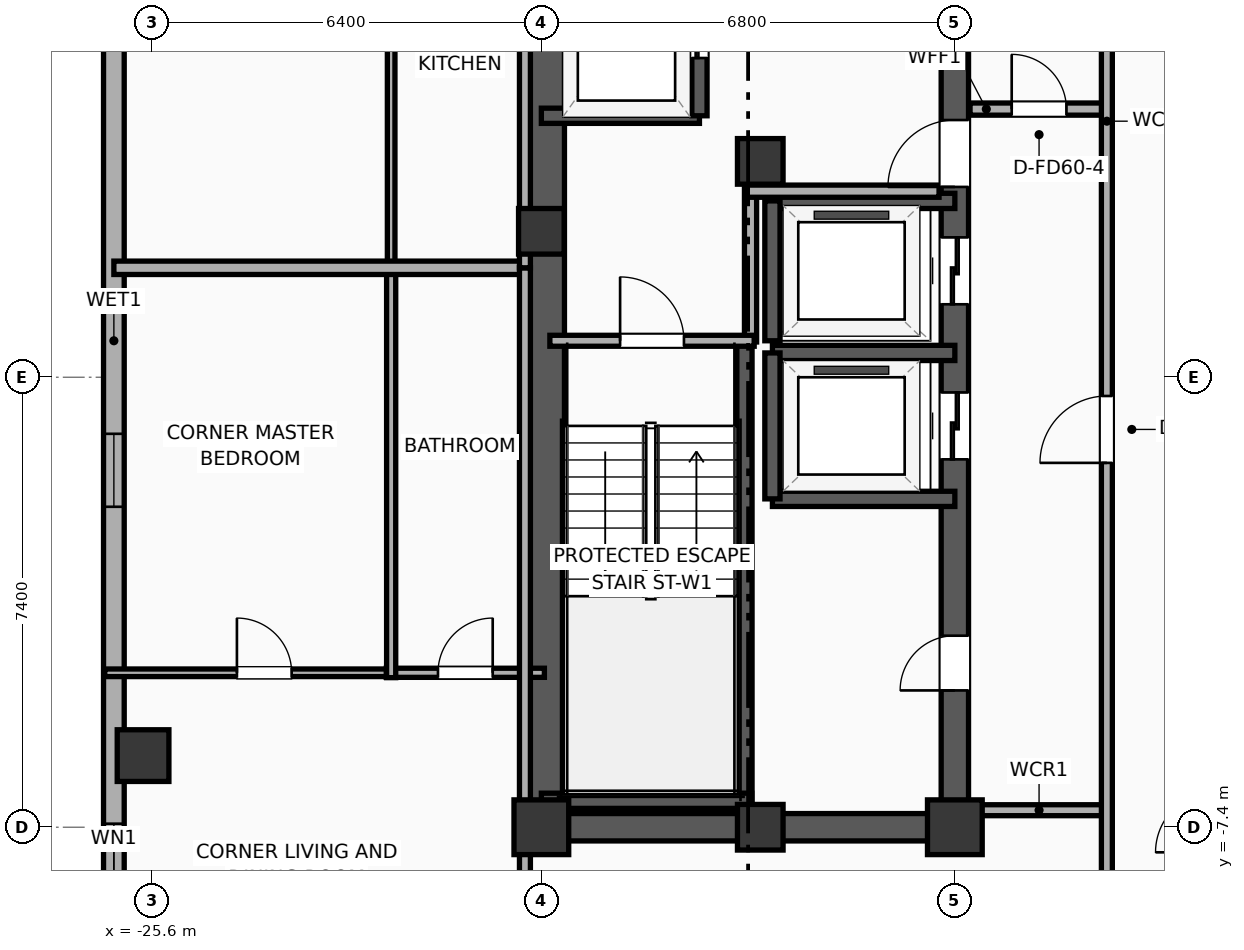
"""IFC4 building model, lengths in metres.
Left out: names, types, materials, properties, quantities, classifications, styles, units other than length and angle.
Written with IfcOpenShell. Run it as: python <this file> out.ifc"""

import sys

from ifc_helpers import new_model, si_unit, direction, frame, frame_2d, origin, origin_2d, place, context, subcontext, project, spatial, rectangle, hollow_rectangle, extrude, element, fill, save


model = new_model("IFC4")
c1 = context("Model", 3, precision=1e-05, world=origin(), true_north=direction((0.0, 1.0)))
c2 = subcontext(c1, "Body", "Model", "MODEL_VIEW")
j1 = project(units=[si_unit("LENGTHUNIT", "METRE"), si_unit("PLANEANGLEUNIT", "RADIAN")], contexts=[c1])
p1 = place(None, origin())
s1 = spatial("IfcSite", under=j1, at=p1, CompositionType="ELEMENT")
p2 = place(p1, origin())
s2 = spatial("IfcBuilding", under=s1, at=p2, CompositionType="ELEMENT")
p3 = place(p2, frame((0.0, 0.0, 200.2)))
s3 = spatial("IfcBuildingStorey", under=s2, at=p3, CompositionType="ELEMENT", Elevation=200.2)
p4 = place(p3, frame((-19.2, -7.4, 0.0), z_axis=(0.0, 0.0, 1.0), x_axis=(1.0, 0.0, 0.0)))
e1 = element("IfcColumn", 1, at=p4, inside=s3, PredefinedType="COLUMN", context=c2, shape_type="SweptSolid", body=[
    extrude(rectangle(XDim=0.9, YDim=0.9, at=origin_2d()), origin(), (0.0, 0.0, 1.0), 3.9),
])
for number, where, z_axis, x_axis in (
    (2, (-19.2, 2.4, 0.0), (0.0, 0.0, 1.0), (1.0, 0.0, 0.0)),
    (3, (-15.6, -7.4, 0.0), (0.0, 0.0, 1.0), (1.0, 0.0, 0.0)),
):
    element("IfcColumn", number, at=place(p3, frame(where, z_axis=z_axis, x_axis=x_axis)), inside=s3, PredefinedType="COLUMN", context=c2, shape_type="SweptSolid", body=[
        extrude(rectangle(XDim=0.75, YDim=0.75, at=origin_2d()), origin(), (0.0, 0.0, 1.0), 3.9),
    ])
p5 = place(p3, frame((-12.4, -7.4, 0.0), z_axis=(0.0, 0.0, 1.0), x_axis=(1.0, 0.0, 0.0)))
e4 = element("IfcColumn", 4, at=p5, inside=s3, PredefinedType="COLUMN", context=c2, shape_type="SweptSolid", body=[
    extrude(rectangle(XDim=0.9, YDim=0.9, at=origin_2d()), origin(), (0.0, 0.0, 1.0), 3.9),
])
p6 = place(p3, frame((-15.6, 3.55, 0.0), z_axis=(0.0, 0.0, 1.0), x_axis=(1.0, 0.0, 0.0)))
e5 = element("IfcColumn", 5, at=p6, inside=s3, PredefinedType="COLUMN", context=c2, shape_type="SweptSolid", body=[
    extrude(rectangle(XDim=0.75, YDim=0.75, at=origin_2d()), origin(), (0.0, 0.0, 1.0), 3.9),
])
p7 = place(p3, frame((-19.425, -7.4, 0.0), z_axis=(0.0, 0.0, 1.0), x_axis=(1.0, 0.0, 0.0)))
e6 = element("IfcWall", 6, at=p7, inside=s3, PredefinedType="SHEAR", context=c2, shape_type="SweptSolid", body=[
    extrude(rectangle(XDim=7.25, YDim=0.45, at=frame_2d((3.625, 0.0))), origin(), (0.0, 0.0, 1.0), 3.65),
])
p8 = place(p3, frame((-19.145, -7.4, 0.0), z_axis=(0.0, 0.0, 1.0), x_axis=(0.0, 1.0, 0.0)))
e7 = element("IfcWall", 7, at=p8, inside=s3, PredefinedType="SHEAR", context=c2, shape_type="SweptSolid", body=[
    extrude(rectangle(XDim=14.8, YDim=0.65, at=frame_2d((7.4, 0.0))), origin(), (0.0, 0.0, 1.0), 3.65),
])
p9 = place(p3, frame((-12.4, -7.4, 0.0), z_axis=(0.0, 0.0, 1.0), x_axis=(0.0, 1.0, 0.0)))
e8 = element("IfcWall", 8, at=p9, inside=s3, PredefinedType="SHEAR", context=c2, shape_type="SweptSolid", body=[
    extrude(rectangle(XDim=14.8, YDim=0.45, at=frame_2d((7.4, 0.0))), origin(), (0.0, 0.0, 1.0), 3.65),
])
p10 = place(p9, frame((6.05, 0.0, 0.0)))
e9 = element("IfcOpeningElement", 9, at=p10, cuts=e8, PredefinedType="OPENING", context=c2, shape_type="SweptSolid", body=[
    extrude(rectangle(XDim=1.1, YDim=2.05, at=frame_2d((0.55, 1.025))), frame((0.0, 0.235, 0.0), z_axis=(0.0, -1.0, 0.0), x_axis=(1.0, 0.0, 0.0)), (0.0, 0.0, 1.0), 0.47),
])
p11 = place(p9, frame((8.6, 0.0, 0.0)))
e10 = element("IfcOpeningElement", 10, at=p11, cuts=e8, PredefinedType="OPENING", context=c2, shape_type="SweptSolid", body=[
    extrude(rectangle(XDim=1.1, YDim=2.05, at=frame_2d((0.55, 1.025))), frame((0.0, 0.235, 0.0), z_axis=(0.0, -1.0, 0.0), x_axis=(1.0, 0.0, 0.0)), (0.0, 0.0, 1.0), 0.47),
])
p12 = place(p9, frame((10.53, 0.0, 0.0)))
e11 = element("IfcOpeningElement", 11, at=p12, cuts=e8, PredefinedType="OPENING", context=c2, shape_type="SweptSolid", body=[
    extrude(rectangle(XDim=1.1, YDim=2.05, at=frame_2d((0.55, 1.025))), frame((0.0, 0.235, 0.0), z_axis=(0.0, -1.0, 0.0), x_axis=(1.0, 0.0, 0.0)), (0.0, 0.0, 1.0), 0.47),
])
p13 = place(p9, frame((2.25, 0.0, 0.0)))
e12 = element("IfcOpeningElement", 12, at=p13, cuts=e8, PredefinedType="OPENING", context=c2, shape_type="SweptSolid", body=[
    extrude(rectangle(XDim=0.9, YDim=2.05, at=frame_2d((0.45, 1.025))), frame((0.0, 0.235, 0.0), z_axis=(0.0, -1.0, 0.0), x_axis=(1.0, 0.0, 0.0)), (0.0, 0.0, 1.0), 0.47),
])
p14 = place(p3, frame((-15.86, -7.085, 0.0), z_axis=(0.0, 0.0, 1.0), x_axis=(0.0, 1.0, 0.0)))
e13 = element("IfcWall", 13, at=p14, inside=s3, PredefinedType="SOLIDWALL", context=c2, shape_type="SweptSolid", body=[
    extrude(rectangle(XDim=7.685, YDim=0.25, at=frame_2d((3.843, 0.0))), origin(), (0.0, 0.0, 1.0), 3.65),
])
p15 = place(p3, frame((-19.2, -6.965, 0.0), z_axis=(0.0, 0.0, 1.0), x_axis=(1.0, 0.0, 0.0)))
e14 = element("IfcWall", 14, at=p15, inside=s3, PredefinedType="SOLIDWALL", context=c2, shape_type="SweptSolid", body=[
    extrude(rectangle(XDim=3.46, YDim=0.25, at=frame_2d((1.73, 0.0))), origin(), (0.0, 0.0, 1.0), 3.65),
])
p16 = place(p3, frame((-25.75, -6.222, 0.0), z_axis=(0.0, 0.0, 1.0), x_axis=(1.0, 0.0, 0.0)))
e15 = element("IfcColumn", 15, at=p16, inside=s3, PredefinedType="COLUMN", context=c2, shape_type="SweptSolid", body=[
    extrude(hollow_rectangle(XDim=0.85, YDim=0.85, WallThickness=0.028, at=origin_2d()), origin(), (0.0, 0.0, 1.0), 3.9),
])
p17 = place(p3, frame((-26.23, -15.383, 0.0), z_axis=(0.0, 0.0, 1.0), x_axis=(0.0, 1.0, 0.0)))
e16 = element("IfcWall", 16, at=p17, inside=s3, PredefinedType="ELEMENTEDWALL", context=c2, shape_type="SweptSolid", body=[
    extrude(rectangle(XDim=31.967, YDim=0.34, at=frame_2d((15.983, 0.0))), origin(), (0.0, 0.0, 1.0), 2.54),
])
p18 = place(p17, frame((6.242, 0.0, 0.75)))
e17 = element("IfcOpeningElement", 17, at=p18, cuts=e16, PredefinedType="OPENING", context=c2, shape_type="SweptSolid", body=[
    extrude(rectangle(XDim=1.8, YDim=1.63, at=frame_2d((0.9, 0.815))), frame((0.0, 0.18, 0.0), z_axis=(0.0, -1.0, 0.0), x_axis=(1.0, 0.0, 0.0)), (0.0, 0.0, 1.0), 0.36),
])
p19 = place(p17, frame((23.925, 0.0, 0.75)))
e18 = element("IfcOpeningElement", 18, at=p19, cuts=e16, PredefinedType="OPENING", context=c2, shape_type="SweptSolid", body=[
    extrude(rectangle(XDim=1.8, YDim=1.63, at=frame_2d((0.9, 0.815))), frame((0.0, 0.18, 0.0), z_axis=(0.0, -1.0, 0.0), x_axis=(1.0, 0.0, 0.0)), (0.0, 0.0, 1.0), 0.36),
])
p20 = place(p17, frame((13.253, 0.0, 0.75)))
e19 = element("IfcOpeningElement", 19, at=p20, cuts=e16, PredefinedType="OPENING", context=c2, shape_type="SweptSolid", body=[
    extrude(rectangle(XDim=1.2, YDim=1.63, at=frame_2d((0.6, 0.815))), frame((0.0, 0.18, 0.0), z_axis=(0.0, -1.0, 0.0), x_axis=(1.0, 0.0, 0.0)), (0.0, 0.0, 1.0), 0.36),
])
p21 = place(p17, frame((29.348, 0.0, 0.75)))
e20 = element("IfcOpeningElement", 20, at=p21, cuts=e16, PredefinedType="OPENING", context=c2, shape_type="SweptSolid", body=[
    extrude(rectangle(XDim=1.2, YDim=1.63, at=frame_2d((0.6, 0.815))), frame((0.0, 0.18, 0.0), z_axis=(0.0, -1.0, 0.0), x_axis=(1.0, 0.0, 0.0)), (0.0, 0.0, 1.0), 0.36),
])
p22 = place(p3, frame((-19.2, 4.3, 0.0), z_axis=(0.0, 0.0, 1.0), x_axis=(1.0, 0.0, 0.0)))
e21 = element("IfcWall", 21, at=p22, inside=s3, PredefinedType="SOLIDWALL", context=c2, shape_type="SweptSolid", body=[
    extrude(rectangle(XDim=2.6, YDim=0.25, at=frame_2d((1.3, 0.0))), origin(), (0.0, 0.0, 1.0), 3.65),
])
p23 = place(p3, frame((-16.6, 4.3, 0.0), z_axis=(0.0, 0.0, 1.0), x_axis=(0.0, 1.0, 0.0)))
e22 = element("IfcWall", 22, at=p23, inside=s3, PredefinedType="SOLIDWALL", context=c2, shape_type="SweptSolid", body=[
    extrude(rectangle(XDim=3.1, YDim=0.25, at=frame_2d((1.55, 0.0))), origin(), (0.0, 0.0, 1.0), 3.65),
])
p24 = place(p23, frame((0.95, 0.0, 0.0)))
e23 = element("IfcOpeningElement", 23, at=p24, cuts=e22, PredefinedType="OPENING", context=c2, shape_type="SweptSolid", body=[
    extrude(rectangle(XDim=1.2, YDim=2.05, at=frame_2d((0.6, 1.025))), frame((0.0, 0.135, 0.0), z_axis=(0.0, -1.0, 0.0), x_axis=(1.0, 0.0, 0.0)), (0.0, 0.0, 1.0), 0.27),
])
for number, where, z_axis, x_axis in (
    (24, (-15.4, -2.0, 0.0), (0.0, 0.0, 1.0), (1.0, 0.0, 0.0)),
    (25, (-12.4, 0.4, 0.0), (0.0, 0.0, 1.0), (-1.0, 0.0, 0.0)),
):
    element("IfcWall", number, at=place(p3, frame(where, z_axis=z_axis, x_axis=x_axis)), inside=s3, PredefinedType="SOLIDWALL", context=c2, shape_type="SweptSolid", body=[
        extrude(rectangle(XDim=3.0, YDim=0.25, at=frame_2d((1.5, 0.0))), origin(), (0.0, 0.0, 1.0), 3.65),
    ])
p25 = place(p3, frame((-15.4, 0.4, 0.0), z_axis=(0.0, 0.0, 1.0), x_axis=(0.0, -1.0, 0.0)))
e26 = element("IfcWall", 26, at=p25, inside=s3, PredefinedType="SOLIDWALL", context=c2, shape_type="SweptSolid", body=[
    extrude(rectangle(XDim=2.4, YDim=0.25, at=frame_2d((1.2, 0.0))), origin(), (0.0, 0.0, 1.0), 3.65),
])
p26 = place(p3, frame((-12.4, 2.9, 0.0), z_axis=(0.0, 0.0, 1.0), x_axis=(-1.0, 0.0, 0.0)))
e27 = element("IfcWall", 27, at=p26, inside=s3, PredefinedType="SOLIDWALL", context=c2, shape_type="SweptSolid", body=[
    extrude(rectangle(XDim=3.0, YDim=0.25, at=frame_2d((1.5, 0.0))), origin(), (0.0, 0.0, 1.0), 3.65),
])
p27 = place(p3, frame((-15.4, 2.9, 0.0), z_axis=(0.0, 0.0, 1.0), x_axis=(0.0, -1.0, 0.0)))
e28 = element("IfcWall", 28, at=p27, inside=s3, PredefinedType="SOLIDWALL", context=c2, shape_type="SweptSolid", body=[
    extrude(rectangle(XDim=2.3, YDim=0.25, at=frame_2d((1.15, 0.0))), origin(), (0.0, 0.0, 1.0), 3.65),
])
p28 = place(p3, frame((-15.76, 0.58, 0.0), z_axis=(0.0, 0.0, 1.0), x_axis=(0.0, 1.0, 0.0)))
e29 = element("IfcWall", 29, at=p28, inside=s3, PredefinedType="PARTITIONING", context=c2, shape_type="SweptSolid", body=[
    extrude(rectangle(XDim=2.52, YDim=0.2, at=frame_2d((1.26, 0.0))), origin(), (0.0, 0.0, 1.0), 3.65),
])
p29 = place(p3, frame((-15.82, 3.06, 0.0), z_axis=(0.0, 0.0, 1.0), x_axis=(1.0, 0.0, 0.0)))
e30 = element("IfcWall", 30, at=p29, inside=s3, PredefinedType="PARTITIONING", context=c2, shape_type="SweptSolid", body=[
    extrude(rectangle(XDim=3.16, YDim=0.2, at=frame_2d((1.58, 0.0))), origin(), (0.0, 0.0, 1.0), 3.65),
])
p30 = place(p3, frame((-19.06, 0.6, 0.0), z_axis=(0.0, 0.0, 1.0), x_axis=(1.0, 0.0, 0.0)))
e31 = element("IfcWall", 31, at=p30, inside=s3, PredefinedType="PARTITIONING", context=c2, shape_type="SweptSolid", body=[
    extrude(rectangle(XDim=3.36, YDim=0.18, at=frame_2d((1.68, 0.0))), origin(), (0.0, 0.0, 1.0), 3.65),
])
p31 = place(p30, frame((1.155, 0.0, 0.0)))
e32 = element("IfcOpeningElement", 32, at=p31, cuts=e31, PredefinedType="OPENING", context=c2, shape_type="SweptSolid", body=[
    extrude(rectangle(XDim=1.05, YDim=2.05, at=frame_2d((0.525, 1.025))), frame((0.0, 0.1, 0.0), z_axis=(0.0, -1.0, 0.0), x_axis=(1.0, 0.0, 0.0)), (0.0, 0.0, 1.0), 0.2),
])
p32 = place(p3, frame((-12.15, 4.41, 0.0), z_axis=(0.0, 0.0, 1.0), x_axis=(1.0, 0.0, 0.0)))
e33 = element("IfcWall", 33, at=p32, inside=s3, PredefinedType="PARTITIONING", context=c2, shape_type="SweptSolid", body=[
    extrude(rectangle(XDim=2.27, YDim=0.2, at=frame_2d((1.135, 0.0))), origin(), (0.0, 0.0, 1.0), 3.65),
])
p33 = place(p32, frame((0.685, 0.0, 0.0)))
e34 = element("IfcOpeningElement", 34, at=p33, cuts=e33, PredefinedType="OPENING", context=c2, shape_type="SweptSolid", body=[
    extrude(rectangle(XDim=0.9, YDim=2.05, at=frame_2d((0.45, 1.025))), frame((0.0, 0.11, 0.0), z_axis=(0.0, -1.0, 0.0), x_axis=(1.0, 0.0, 0.0)), (0.0, 0.0, 1.0), 0.22),
])
p34 = place(p3, frame((-12.15, -7.12, 0.0), z_axis=(0.0, 0.0, 1.0), x_axis=(1.0, 0.0, 0.0)))
e35 = element("IfcWall", 35, at=p34, inside=s3, PredefinedType="PARTITIONING", context=c2, shape_type="SweptSolid", body=[
    extrude(rectangle(XDim=2.27, YDim=0.18, at=frame_2d((1.135, 0.0))), origin(), (0.0, 0.0, 1.0), 3.65),
])
p35 = place(p3, frame((-9.9, -8.58, 0.0), z_axis=(0.0, 0.0, 1.0), x_axis=(0.0, 1.0, 0.0)))
e36 = element("IfcWall", 36, at=p35, inside=s3, PredefinedType="PARTITIONING", context=c2, shape_type="SweptSolid", body=[
    extrude(rectangle(XDim=17.16, YDim=0.18, at=frame_2d((8.58, 0.0))), origin(), (0.0, 0.0, 1.0), 3.65),
])
p36 = place(p35, frame((7.172, 0.0, 0.0)))
e37 = element("IfcOpeningElement", 37, at=p36, cuts=e36, PredefinedType="OPENING", context=c2, shape_type="SweptSolid", body=[
    extrude(rectangle(XDim=1.1, YDim=2.05, at=frame_2d((0.55, 1.025))), frame((0.0, 0.1, 0.0), z_axis=(0.0, -1.0, 0.0), x_axis=(1.0, 0.0, 0.0)), (0.0, 0.0, 1.0), 0.2),
])
p37 = place(p3, frame((-26.38, -4.86, 0.0), z_axis=(0.0, 0.0, 1.0), x_axis=(1.0, 0.0, 0.0)))
e38 = element("IfcWall", 38, at=p37, inside=s3, PredefinedType="PARTITIONING", context=c2, shape_type="SweptSolid", body=[
    extrude(rectangle(XDim=4.77, YDim=0.125, at=frame_2d((2.385, 0.0))), origin(), (0.0, 0.0, 1.0), 3.65),
])
p38 = place(p37, frame((2.174, 0.0, 0.0)))
e39 = element("IfcOpeningElement", 39, at=p38, cuts=e38, PredefinedType="OPENING", context=c2, shape_type="SweptSolid", body=[
    extrude(rectangle(XDim=0.9, YDim=2.05, at=frame_2d((0.45, 1.025))), frame((0.0, 0.073, 0.0), z_axis=(0.0, -1.0, 0.0), x_axis=(1.0, 0.0, 0.0)), (0.0, 0.0, 1.0), 0.145),
])
p39 = place(p3, frame((-21.75, -4.86, 0.0), z_axis=(0.0, 0.0, 1.0), x_axis=(1.0, 0.0, 0.0)))
e40 = element("IfcWall", 40, at=p39, inside=s3, PredefinedType="PLUMBINGWALL", context=c2, shape_type="SweptSolid", body=[
    extrude(rectangle(XDim=2.6, YDim=0.15, at=frame_2d((1.3, 0.0))), origin(), (0.0, 0.0, 1.0), 3.65),
])
p40 = place(p39, frame((0.85, 0.0, 0.0)))
e41 = element("IfcOpeningElement", 41, at=p40, cuts=e40, PredefinedType="OPENING", context=c2, shape_type="SweptSolid", body=[
    extrude(rectangle(XDim=0.9, YDim=2.05, at=frame_2d((0.45, 1.025))), frame((0.0, 0.085, 0.0), z_axis=(0.0, -1.0, 0.0), x_axis=(1.0, 0.0, 0.0)), (0.0, 0.0, 1.0), 0.17),
])
p41 = place(p3, frame((-21.67, -4.94, 0.0), z_axis=(0.0, 0.0, 1.0), x_axis=(0.0, 1.0, 0.0)))
e42 = element("IfcWall", 42, at=p41, inside=s3, PredefinedType="PLUMBINGWALL", context=c2, shape_type="SweptSolid", body=[
    extrude(rectangle(XDim=6.72, YDim=0.15, at=frame_2d((3.36, 0.0))), origin(), (0.0, 0.0, 1.0), 3.65),
])
p42 = place(p3, frame((-21.67, 1.82, 0.0), z_axis=(0.0, 0.0, 1.0), x_axis=(0.0, 1.0, 0.0)))
e43 = element("IfcWall", 43, at=p42, inside=s3, PredefinedType="PARTITIONING", context=c2, shape_type="SweptSolid", body=[
    extrude(rectangle(XDim=6.72, YDim=0.125, at=frame_2d((3.36, 0.0))), origin(), (0.0, 0.0, 1.0), 3.65),
])
p43 = place(p3, frame((-19.47, 1.8, 0.0), z_axis=(0.0, 0.0, 1.0), x_axis=(-1.0, 0.0, 0.0)))
e44 = element("IfcWall", 44, at=p43, inside=s3, PredefinedType="PARTITIONING", context=c2, shape_type="SweptSolid", body=[
    extrude(rectangle(XDim=6.76, YDim=0.22, at=frame_2d((3.38, 0.0))), origin(), (0.0, 0.0, 1.0), 3.65),
])
p44 = place(p3, frame((-19.47, -18.83, 0.0), z_axis=(0.0, 0.0, 1.0), x_axis=(0.0, 1.0, 0.0)))
e45 = element("IfcWall", 45, at=p44, inside=s3, PredefinedType="PARTITIONING", context=c2, shape_type="SweptSolid", body=[
    extrude(rectangle(XDim=20.63, YDim=0.18, at=frame_2d((10.315, 0.0))), origin(), (0.0, 0.0, 1.0), 2.54),
])
p45 = place(p44, frame((9.149, 0.0, 0.0)))
e46 = element("IfcOpeningElement", 46, at=p45, cuts=e45, PredefinedType="OPENING", context=c2, shape_type="SweptSolid", body=[
    extrude(rectangle(XDim=0.9, YDim=2.05, at=frame_2d((0.45, 1.025))), frame((0.0, 0.1, 0.0), z_axis=(0.0, -1.0, 0.0), x_axis=(1.0, 0.0, 0.0)), (0.0, 0.0, 1.0), 0.2),
])
p46 = place(p3, frame((-19.47, 1.8, 0.0), z_axis=(0.0, 0.0, 1.0), x_axis=(0.0, 1.0, 0.0)))
e47 = element("IfcWall", 47, at=p46, inside=s3, PredefinedType="PARTITIONING", context=c2, shape_type="SweptSolid", body=[
    extrude(rectangle(XDim=18.23, YDim=0.18, at=frame_2d((9.115, 0.0))), origin(), (0.0, 0.0, 1.0), 2.54),
])
p47 = place(p46, frame((6.98, 0.0, 0.0)))
e48 = element("IfcOpeningElement", 48, at=p47, cuts=e47, PredefinedType="OPENING", context=c2, shape_type="SweptSolid", body=[
    extrude(rectangle(XDim=0.9, YDim=2.05, at=frame_2d((0.45, 1.025))), frame((0.0, 0.1, 0.0), z_axis=(0.0, -1.0, 0.0), x_axis=(1.0, 0.0, 0.0)), (0.0, 0.0, 1.0), 0.2),
])
p48 = place(p18, origin())
e49 = element("IfcWindow", 49, at=p48, inside=s3, PartitioningType="SINGLE_PANEL", PredefinedType="WINDOW", context=c2, shape_type="SweptSolid", body=[
    extrude(rectangle(XDim=1.8, YDim=1.63, at=frame_2d((0.9, 0.815))), frame((0.0, 0.03, 0.0), z_axis=(0.0, -1.0, 0.0), x_axis=(1.0, 0.0, 0.0)), (0.0, 0.0, 1.0), 0.06),
])
fill(e17, e49)
p49 = place(p20, origin())
e50 = element("IfcWindow", 50, at=p49, inside=s3, PartitioningType="SINGLE_PANEL", PredefinedType="WINDOW", context=c2, shape_type="SweptSolid", body=[
    extrude(rectangle(XDim=1.2, YDim=1.63, at=frame_2d((0.6, 0.815))), frame((0.0, 0.03, 0.0), z_axis=(0.0, -1.0, 0.0), x_axis=(1.0, 0.0, 0.0)), (0.0, 0.0, 1.0), 0.06),
])
fill(e19, e50)
p50 = place(p24, origin())
e51 = element("IfcDoor", 51, at=p50, inside=s3, OperationType="SLIDING_TO_LEFT", PredefinedType="DOOR", context=c2, shape_type="SweptSolid", body=[
    extrude(rectangle(XDim=1.2, YDim=2.05, at=frame_2d((0.6, 1.025))), frame((0.0, 0.025, 0.0), z_axis=(0.0, -1.0, 0.0), x_axis=(1.0, 0.0, 0.0)), (0.0, 0.0, 1.0), 0.05),
])
fill(e23, e51)
p51 = place(p10, origin())
e52 = element("IfcDoor", 52, at=p51, inside=s3, OperationType="SLIDING_TO_LEFT", PredefinedType="DOOR", context=c2, shape_type="SweptSolid", body=[
    extrude(rectangle(XDim=1.1, YDim=2.05, at=frame_2d((0.55, 1.025))), frame((0.0, 0.025, 0.0), z_axis=(0.0, -1.0, 0.0), x_axis=(1.0, 0.0, 0.0)), (0.0, 0.0, 1.0), 0.05),
])
fill(e9, e52)
p52 = place(p11, origin())
e53 = element("IfcDoor", 53, at=p52, inside=s3, OperationType="SLIDING_TO_LEFT", PredefinedType="DOOR", context=c2, shape_type="SweptSolid", body=[
    extrude(rectangle(XDim=1.1, YDim=2.05, at=frame_2d((0.55, 1.025))), frame((0.0, 0.025, 0.0), z_axis=(0.0, -1.0, 0.0), x_axis=(1.0, 0.0, 0.0)), (0.0, 0.0, 1.0), 0.05),
])
fill(e10, e53)
p53 = place(p31, origin())
e54 = element("IfcDoor", 54, at=p53, inside=s3, OperationType="SINGLE_SWING_LEFT", PredefinedType="DOOR", context=c2, shape_type="SweptSolid", body=[
    extrude(rectangle(XDim=1.05, YDim=2.05, at=frame_2d((0.525, 1.025))), frame((0.0, 0.025, 0.0), z_axis=(0.0, -1.0, 0.0), x_axis=(1.0, 0.0, 0.0)), (0.0, 0.0, 1.0), 0.05),
])
fill(e32, e54)
p54 = place(p33, origin())
e55 = element("IfcDoor", 55, at=p54, inside=s3, OperationType="SINGLE_SWING_LEFT", PredefinedType="DOOR", context=c2, shape_type="SweptSolid", body=[
    extrude(rectangle(XDim=0.9, YDim=2.05, at=frame_2d((0.45, 1.025))), frame((0.0, 0.025, 0.0), z_axis=(0.0, -1.0, 0.0), x_axis=(1.0, 0.0, 0.0)), (0.0, 0.0, 1.0), 0.05),
])
fill(e34, e55)
p55 = place(p36, origin())
e56 = element("IfcDoor", 56, at=p55, inside=s3, OperationType="SINGLE_SWING_LEFT", PredefinedType="DOOR", context=c2, shape_type="SweptSolid", body=[
    extrude(rectangle(XDim=1.1, YDim=2.05, at=frame_2d((0.55, 1.025))), frame((0.0, 0.025, 0.0), z_axis=(0.0, -1.0, 0.0), x_axis=(1.0, 0.0, 0.0)), (0.0, 0.0, 1.0), 0.05),
])
fill(e37, e56)
p56 = place(p38, origin())
e57 = element("IfcDoor", 57, at=p56, inside=s3, OperationType="SINGLE_SWING_LEFT", PredefinedType="DOOR", context=c2, shape_type="SweptSolid", body=[
    extrude(rectangle(XDim=0.9, YDim=2.05, at=frame_2d((0.45, 1.025))), frame((0.0, 0.025, 0.0), z_axis=(0.0, -1.0, 0.0), x_axis=(1.0, 0.0, 0.0)), (0.0, 0.0, 1.0), 0.05),
])
fill(e39, e57)
p57 = place(p40, origin())
e58 = element("IfcDoor", 58, at=p57, inside=s3, OperationType="SINGLE_SWING_RIGHT", PredefinedType="DOOR", context=c2, shape_type="SweptSolid", body=[
    extrude(rectangle(XDim=0.9, YDim=2.05, at=frame_2d((0.45, 1.025))), frame((0.0, 0.025, 0.0), z_axis=(0.0, -1.0, 0.0), x_axis=(1.0, 0.0, 0.0)), (0.0, 0.0, 1.0), 0.05),
])
fill(e41, e58)
p58 = place(p12, origin())
e59 = element("IfcDoor", 59, at=p58, inside=s3, OperationType="SINGLE_SWING_LEFT", PredefinedType="DOOR", context=c2, shape_type="SweptSolid", body=[
    extrude(rectangle(XDim=1.1, YDim=2.05, at=frame_2d((0.55, 1.025))), frame((0.0, 0.025, 0.0), z_axis=(0.0, -1.0, 0.0), x_axis=(1.0, 0.0, 0.0)), (0.0, 0.0, 1.0), 0.05),
])
fill(e11, e59)
p59 = place(p13, origin())
e60 = element("IfcDoor", 60, at=p59, inside=s3, OperationType="SINGLE_SWING_LEFT", PredefinedType="DOOR", context=c2, shape_type="SweptSolid", body=[
    extrude(rectangle(XDim=0.9, YDim=2.05, at=frame_2d((0.45, 1.025))), frame((0.0, 0.025, 0.0), z_axis=(0.0, -1.0, 0.0), x_axis=(1.0, 0.0, 0.0)), (0.0, 0.0, 1.0), 0.05),
])
fill(e12, e60)
save(model, sys.argv[1])
